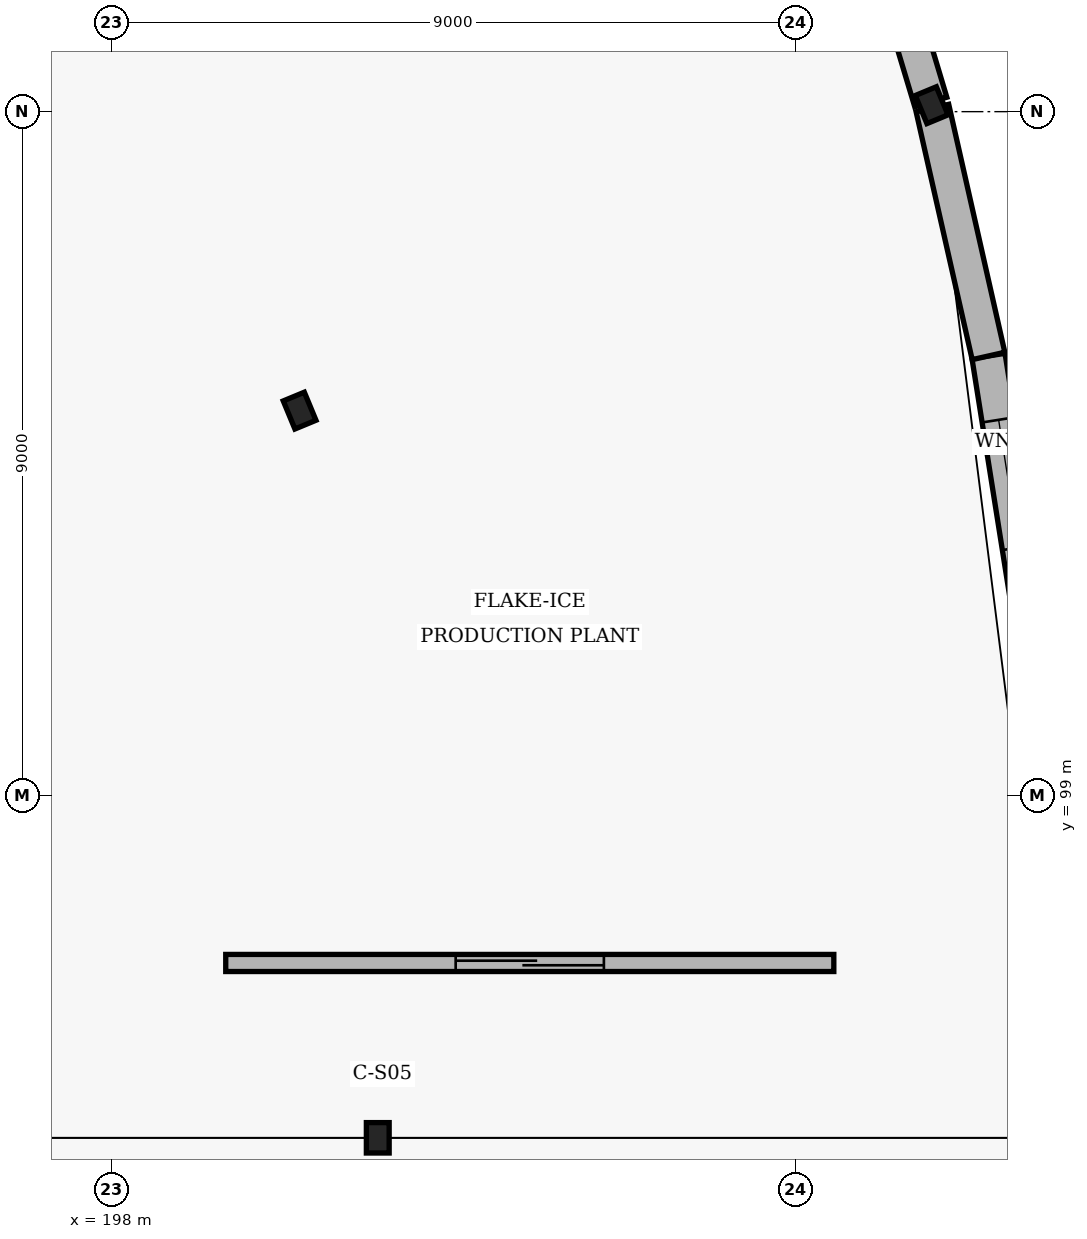
"""IFC4 building model, lengths in metres.
Left out: names, types, materials, properties, quantities, classifications, styles, units other than length and angle.
Written with IfcOpenShell. Run it as: python <this file> out.ifc"""

import sys

from ifc_helpers import new_model, si_unit, direction, frame, frame_2d, origin, origin_2d, place, context, subcontext, project, spatial, rectangle, i_section, extrude, element, fill, save


model = new_model("IFC4")
c1 = context("Model", 3, precision=1e-05, world=origin(), true_north=direction((0.0, 1.0)))
c2 = subcontext(c1, "Body", "Model", "MODEL_VIEW")
j1 = project(units=[si_unit("LENGTHUNIT", "METRE"), si_unit("PLANEANGLEUNIT", "RADIAN")], contexts=[c1])
p1 = place(None, origin())
s1 = spatial("IfcSite", under=j1, at=p1, CompositionType="ELEMENT")
p2 = place(p1, origin())
s2 = spatial("IfcBuilding", under=s1, at=p2, CompositionType="ELEMENT")
p3 = place(p2, origin())
s3 = spatial("IfcBuildingStorey", under=s2, at=p3, CompositionType="ELEMENT", Elevation=0.0)
for number, where, z_axis, x_axis in (
    (1, (201.5, 94.5, 0.0), (0.0, 0.0, 1.0), (1.0, 0.0, 0.0)),
    (2, (200.472, 104.067, 0.0), (0.0, 0.0, 1.0), (0.924, 0.383, 0.0)),
    (3, (208.787, 108.085, 0.0), (0.0, 0.0, 1.0), (0.924, 0.383, 0.0)),
):
    element("IfcColumn", number, at=place(p3, frame(where, z_axis=z_axis, x_axis=x_axis)), inside=s3, PredefinedType="COLUMN", context=c2, shape_type="SweptSolid", body=[
        extrude(i_section(OverallWidth=0.3, OverallDepth=0.4, WebThickness=0.013, FlangeThickness=0.024, FilletRadius=0.027, at=origin_2d()), origin(), (0.0, 0.0, 1.0), 5.4),
    ])
p4 = place(p3, frame((210.068, 101.426, 0.0), z_axis=(0.0, 0.0, 1.0), x_axis=(-0.156736432103, 0.98764046639, 0.0)))
e4 = element("IfcWall", 4, at=p4, inside=s3, PredefinedType="SOLIDWALL", context=c2, shape_type="SweptSolid", body=[
    extrude(rectangle(XDim=3.402, YDim=0.44, at=frame_2d((1.701, 0.0))), origin(), (0.0, 0.0, 1.0), 4.7),
])
p5 = place(p4, frame((0.851, 0.0, 0.95)))
e5 = element("IfcOpeningElement", 5, at=p5, cuts=e4, PredefinedType="OPENING", context=c2, shape_type="SweptSolid", body=[
    extrude(rectangle(XDim=1.7, YDim=1.95, at=frame_2d((0.85, 0.975))), frame((0.0, 0.23, 0.0), z_axis=(0.0, -1.0, 0.0), x_axis=(1.0, 0.0, 0.0)), (0.0, 0.0, 1.0), 0.46),
])
p6 = place(p3, frame((209.535, 104.786, 0.0), z_axis=(0.0, 0.0, 1.0), x_axis=(-0.220592446256, 0.975366071101, 0.0)))
e6 = element("IfcWall", 6, at=p6, inside=s3, PredefinedType="SOLIDWALL", context=c2, shape_type="SweptSolid", body=[
    extrude(rectangle(XDim=3.344, YDim=0.44, at=frame_2d((1.672, 0.0))), origin(), (0.0, 0.0, 1.0), 4.7),
])
p7 = place(p3, frame((208.776, 108.126, 0.0), z_axis=(0.0, 0.0, 1.0), x_axis=(-0.287512482209, 0.957776890812, 0.0)))
e7 = element("IfcWall", 7, at=p7, inside=s3, PredefinedType="SOLIDWALL", context=c2, shape_type="SweptSolid", body=[
    extrude(rectangle(XDim=3.266, YDim=0.44, at=frame_2d((1.633, 0.0))), origin(), (0.0, 0.0, 1.0), 4.7),
])
p8 = place(p3, frame((199.5, 96.8, 0.0), z_axis=(0.0, 0.0, 1.0), x_axis=(1.0, 0.0, 0.0)))
e8 = element("IfcWall", 8, at=p8, inside=s3, PredefinedType="PARTITIONING", context=c2, shape_type="SweptSolid", body=[
    extrude(rectangle(XDim=8.0, YDim=0.225, at=frame_2d((4.0, 0.0))), origin(), (0.0, 0.0, 1.0), 4.3),
])
p9 = place(p8, frame((3.025, 0.0, 0.0)))
e9 = element("IfcOpeningElement", 9, at=p9, cuts=e8, PredefinedType="OPENING", context=c2, shape_type="SweptSolid", body=[
    extrude(rectangle(XDim=1.95, YDim=2.5, at=frame_2d((0.975, 1.25))), frame((0.0, 0.123, 0.0), z_axis=(0.0, -1.0, 0.0), x_axis=(1.0, 0.0, 0.0)), (0.0, 0.0, 1.0), 0.245),
])
p10 = place(p5, origin())
e10 = element("IfcWindow", 10, at=p10, inside=s3, PartitioningType="SINGLE_PANEL", PredefinedType="WINDOW", context=c2, shape_type="SweptSolid", body=[
    extrude(rectangle(XDim=1.7, YDim=1.95, at=frame_2d((0.85, 0.975))), frame((0.0, 0.03, 0.0), z_axis=(0.0, -1.0, 0.0), x_axis=(1.0, 0.0, 0.0)), (0.0, 0.0, 1.0), 0.06),
])
fill(e5, e10)
p11 = place(p9, origin())
e11 = element("IfcDoor", 11, at=p11, inside=s3, OperationType="SLIDING_TO_RIGHT", PredefinedType="DOOR", context=c2, shape_type="SweptSolid", body=[
    extrude(rectangle(XDim=1.95, YDim=2.5, at=frame_2d((0.975, 1.25))), frame((0.0, 0.025, 0.0), z_axis=(0.0, -1.0, 0.0), x_axis=(1.0, 0.0, 0.0)), (0.0, 0.0, 1.0), 0.05),
])
fill(e9, e11)
save(model, sys.argv[1])
